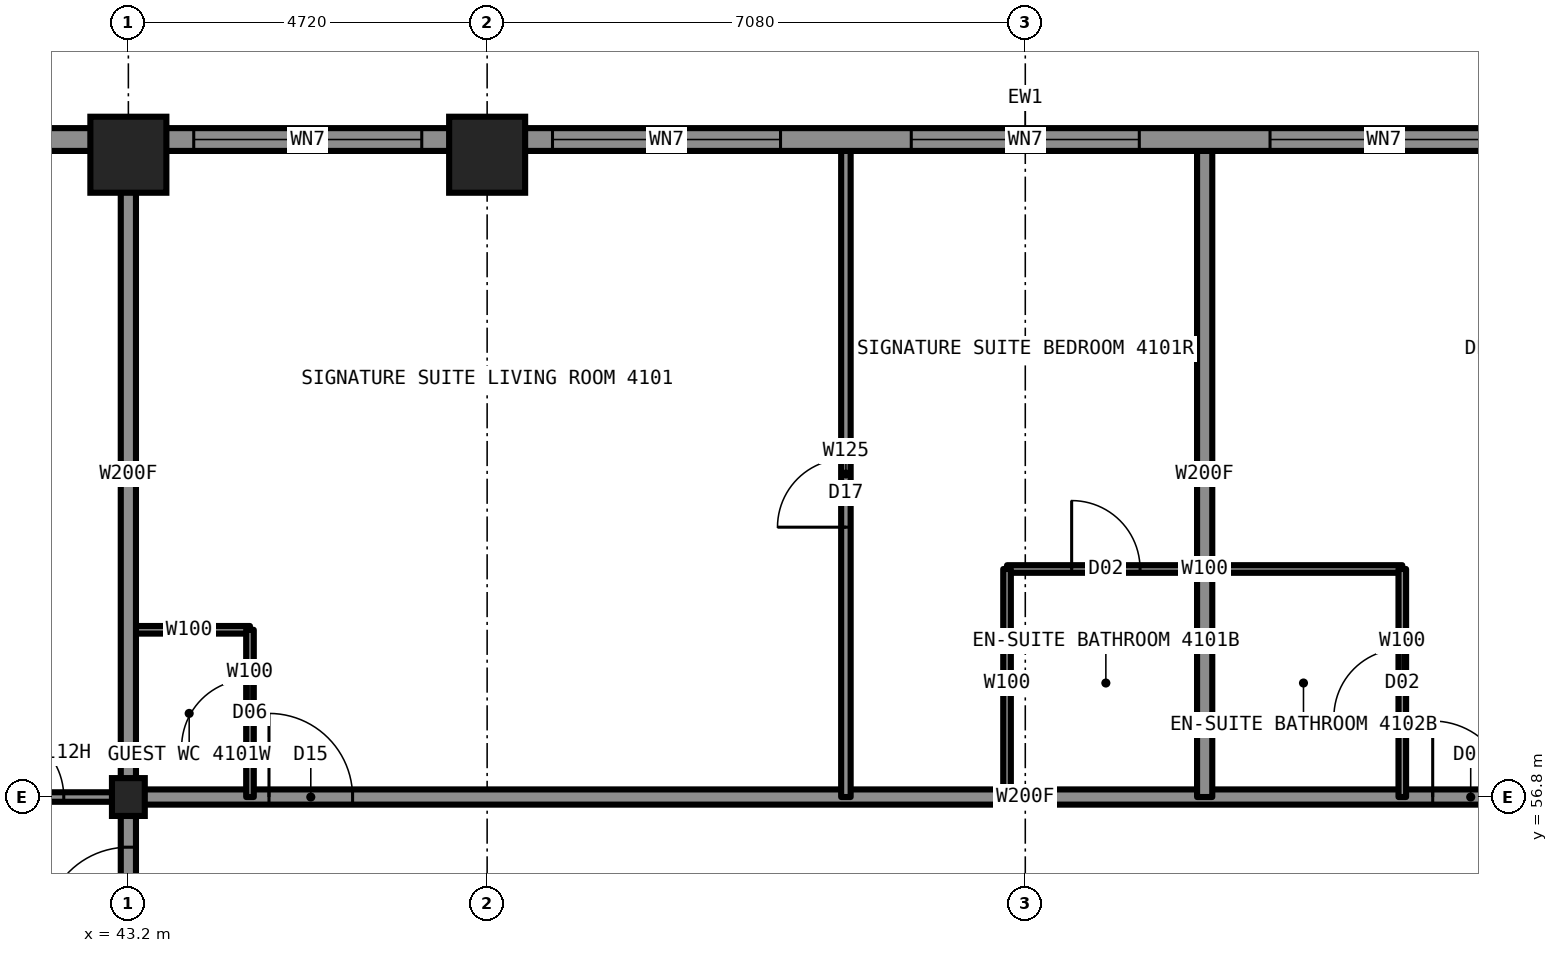
"""IFC4 building model, lengths in metres.
Left out: names, types, materials, properties, quantities, classifications, styles, units other than length and angle.
Written with IfcOpenShell. Run it as: python <this file> out.ifc"""

import sys

from ifc_helpers import new_model, si_unit, direction, frame, frame_2d, origin, origin_2d, place, context, subcontext, project, spatial, rectangle, i_section, extrude, element, fill, save


model = new_model("IFC4")
c1 = context("Model", 3, precision=1e-05, world=origin(), true_north=direction((0.0, 1.0)))
c2 = subcontext(c1, "Body", "Model", "MODEL_VIEW")
j1 = project(units=[si_unit("LENGTHUNIT", "METRE"), si_unit("PLANEANGLEUNIT", "RADIAN")], contexts=[c1])
p1 = place(None, origin())
s1 = spatial("IfcSite", under=j1, at=p1, CompositionType="ELEMENT")
p2 = place(p1, origin())
s2 = spatial("IfcBuilding", under=s1, at=p2, CompositionType="ELEMENT")
p3 = place(p2, frame((0.0, 0.0, 145.9)))
s3 = spatial("IfcBuildingStorey", under=s2, at=p3, CompositionType="ELEMENT", Elevation=145.9)
for number, where, z_axis, x_axis in (
    (1, (43.2, 65.25, 0.0), (0.0, 0.0, 1.0), (1.0, 0.0, 0.0)),
    (2, (47.92, 65.25, 0.0), (0.0, 0.0, 1.0), (1.0, 0.0, 0.0)),
):
    element("IfcColumn", number, at=place(p3, frame(where, z_axis=z_axis, x_axis=x_axis)), inside=s3, PredefinedType="COLUMN", context=c2, shape_type="SweptSolid", body=[
        extrude(i_section(OverallWidth=0.422, OverallDepth=0.465, WebThickness=0.045, FlangeThickness=0.073, at=origin_2d()), origin(), (0.0, 0.0, 1.0), 3.5),
    ])
p4 = place(p3, frame((43.2, 56.8, 0.0), z_axis=(0.0, 0.0, 1.0), x_axis=(1.0, 0.0, 0.0)))
e3 = element("IfcColumn", 3, at=p4, inside=s3, PredefinedType="COLUMN", context=c2, shape_type="SweptSolid", body=[
    extrude(i_section(OverallWidth=0.432, OverallDepth=0.498, WebThickness=0.056, FlangeThickness=0.089, at=origin_2d()), origin(), (0.0, 0.0, 1.0), 3.5),
])
p5 = place(p3, frame((43.2, 56.8, 0.0), z_axis=(0.0, 0.0, 1.0), x_axis=(1.0, 0.0, 0.0)))
e4 = element("IfcWall", 4, at=p5, inside=s3, PredefinedType="PARTITIONING", context=c2, shape_type="SweptSolid", body=[
    extrude(rectangle(XDim=23.6, YDim=0.2, at=frame_2d((11.8, 0.0))), origin(), (0.0, 0.0, 1.0), 3.33),
])
p6 = place(p5, frame((1.85, 0.0, 0.0)))
e5 = element("IfcOpeningElement", 5, at=p6, cuts=e4, PredefinedType="OPENING", context=c2, shape_type="SweptSolid", body=[
    extrude(rectangle(XDim=1.1, YDim=2.2, at=frame_2d((0.55, 1.1))), frame((0.0, 0.11, 0.0), z_axis=(0.0, -1.0, 0.0), x_axis=(1.0, 0.0, 0.0)), (0.0, 0.0, 1.0), 0.22),
])
p7 = place(p5, frame((17.16, 0.0, 0.0)))
e6 = element("IfcOpeningElement", 6, at=p7, cuts=e4, PredefinedType="OPENING", context=c2, shape_type="SweptSolid", body=[
    extrude(rectangle(XDim=1.0, YDim=2.2, at=frame_2d((0.5, 1.1))), frame((0.0, 0.11, 0.0), z_axis=(0.0, -1.0, 0.0), x_axis=(1.0, 0.0, 0.0)), (0.0, 0.0, 1.0), 0.22),
])
p8 = place(p3, frame((34.7, 56.8, 0.0), z_axis=(0.0, 0.0, 1.0), x_axis=(1.0, 0.0, 0.0)))
e7 = element("IfcWall", 7, at=p8, inside=s3, PredefinedType="PARTITIONING", context=c2, shape_type="SweptSolid", body=[
    extrude(rectangle(XDim=8.5, YDim=0.125, at=frame_2d((4.25, 0.0))), origin(), (0.0, 0.0, 1.0), 2.573),
])
p9 = place(p8, frame((6.75, 0.0, 0.0)))
e8 = element("IfcOpeningElement", 8, at=p9, cuts=e7, PredefinedType="OPENING", context=c2, shape_type="SweptSolid", body=[
    extrude(rectangle(XDim=0.9, YDim=2.2, at=frame_2d((0.45, 1.1))), frame((0.0, 0.073, 0.0), z_axis=(0.0, -1.0, 0.0), x_axis=(1.0, 0.0, 0.0)), (0.0, 0.0, 1.0), 0.145),
])
p10 = place(p3, frame((43.2, 59.0, 0.0), z_axis=(0.0, 0.0, 1.0), x_axis=(1.0, 0.0, 0.0)))
e9 = element("IfcWall", 9, at=p10, inside=s3, PredefinedType="PARTITIONING", context=c2, shape_type="SweptSolid", body=[
    extrude(rectangle(XDim=1.6, YDim=0.1, at=frame_2d((0.8, 0.0))), origin(), (0.0, 0.0, 1.0), 3.33),
])
p11 = place(p3, frame((54.76, 59.8, 0.0), z_axis=(0.0, 0.0, 1.0), x_axis=(1.0, 0.0, 0.0)))
e10 = element("IfcWall", 10, at=p11, inside=s3, PredefinedType="PARTITIONING", context=c2, shape_type="SweptSolid", body=[
    extrude(rectangle(XDim=5.2, YDim=0.1, at=frame_2d((2.6, 0.0))), origin(), (0.0, 0.0, 1.0), 3.33),
])
p12 = place(p11, frame((0.85, 0.0, 0.0)))
e11 = element("IfcOpeningElement", 11, at=p12, cuts=e10, PredefinedType="OPENING", context=c2, shape_type="SweptSolid", body=[
    extrude(rectangle(XDim=0.9, YDim=2.1, at=frame_2d((0.45, 1.05))), frame((0.0, 0.06, 0.0), z_axis=(0.0, -1.0, 0.0), x_axis=(1.0, 0.0, 0.0)), (0.0, 0.0, 1.0), 0.12),
])
p13 = place(p3, frame((54.76, 56.8, 0.0), z_axis=(0.0, 0.0, 1.0), x_axis=(0.0, 1.0, 0.0)))
e12 = element("IfcWall", 12, at=p13, inside=s3, PredefinedType="PARTITIONING", context=c2, shape_type="SweptSolid", body=[
    extrude(rectangle(XDim=3.0, YDim=0.1, at=frame_2d((1.5, 0.0))), origin(), (0.0, 0.0, 1.0), 3.33),
])
p14 = place(p3, frame((44.8, 56.8, 0.0), z_axis=(0.0, 0.0, 1.0), x_axis=(0.0, 1.0, 0.0)))
e13 = element("IfcWall", 13, at=p14, inside=s3, PredefinedType="PARTITIONING", context=c2, shape_type="SweptSolid", body=[
    extrude(rectangle(XDim=2.2, YDim=0.1, at=frame_2d((1.1, 0.0))), origin(), (0.0, 0.0, 1.0), 3.33),
])
p15 = place(p14, frame((0.65, 0.0, 0.0)))
e14 = element("IfcOpeningElement", 14, at=p15, cuts=e13, PredefinedType="OPENING", context=c2, shape_type="SweptSolid", body=[
    extrude(rectangle(XDim=0.9, YDim=2.1, at=frame_2d((0.45, 1.05))), frame((0.0, 0.06, 0.0), z_axis=(0.0, -1.0, 0.0), x_axis=(1.0, 0.0, 0.0)), (0.0, 0.0, 1.0), 0.12),
])
p16 = place(p3, frame((43.2, 52.08, 0.0), z_axis=(0.0, 0.0, 1.0), x_axis=(0.0, 1.0, 0.0)))
e15 = element("IfcWall", 15, at=p16, inside=s3, PredefinedType="PARTITIONING", context=c2, shape_type="SweptSolid", body=[
    extrude(rectangle(XDim=4.72, YDim=0.2, at=frame_2d((2.36, 0.0))), origin(), (0.0, 0.0, 1.0), 3.33),
])
p17 = place(p16, frame((2.96, 0.0, 0.0)))
e16 = element("IfcOpeningElement", 16, at=p17, cuts=e15, PredefinedType="OPENING", context=c2, shape_type="SweptSolid", body=[
    extrude(rectangle(XDim=1.1, YDim=2.2, at=frame_2d((0.55, 1.1))), frame((0.0, 0.11, 0.0), z_axis=(0.0, -1.0, 0.0), x_axis=(1.0, 0.0, 0.0)), (0.0, 0.0, 1.0), 0.22),
])
p18 = place(p3, frame((43.2, 56.8, 0.0), z_axis=(0.0, 0.0, 1.0), x_axis=(0.0, 1.0, 0.0)))
e17 = element("IfcWall", 17, at=p18, inside=s3, PredefinedType="PARTITIONING", context=c2, shape_type="SweptSolid", body=[
    extrude(rectangle(XDim=8.5, YDim=0.2, at=frame_2d((4.25, 0.0))), origin(), (0.0, 0.0, 1.0), 2.573),
])
p19 = place(p3, frame((52.64, 56.8, 0.0), z_axis=(0.0, 0.0, 1.0), x_axis=(0.0, 1.0, 0.0)))
e18 = element("IfcWall", 18, at=p19, inside=s3, PredefinedType="PARTITIONING", context=c2, shape_type="SweptSolid", body=[
    extrude(rectangle(XDim=8.5, YDim=0.125, at=frame_2d((4.25, 0.0))), origin(), (0.0, 0.0, 1.0), 3.33),
])
p20 = place(p19, frame((3.55, 0.0, 0.0)))
e19 = element("IfcOpeningElement", 19, at=p20, cuts=e18, PredefinedType="OPENING", context=c2, shape_type="SweptSolid", body=[
    extrude(rectangle(XDim=0.9, YDim=2.2, at=frame_2d((0.45, 1.1))), frame((0.0, 0.073, 0.0), z_axis=(0.0, -1.0, 0.0), x_axis=(1.0, 0.0, 0.0)), (0.0, 0.0, 1.0), 0.145),
])
p21 = place(p3, frame((57.36, 56.8, 0.0), z_axis=(0.0, 0.0, 1.0), x_axis=(0.0, 1.0, 0.0)))
e20 = element("IfcWall", 20, at=p21, inside=s3, PredefinedType="PARTITIONING", context=c2, shape_type="SweptSolid", body=[
    extrude(rectangle(XDim=8.5, YDim=0.2, at=frame_2d((4.25, 0.0))), origin(), (0.0, 0.0, 1.0), 3.33),
])
p22 = place(p3, frame((59.96, 56.8, 0.0), z_axis=(0.0, 0.0, 1.0), x_axis=(0.0, 1.0, 0.0)))
e21 = element("IfcWall", 21, at=p22, inside=s3, PredefinedType="PARTITIONING", context=c2, shape_type="SweptSolid", body=[
    extrude(rectangle(XDim=3.0, YDim=0.1, at=frame_2d((1.5, 0.0))), origin(), (0.0, 0.0, 1.0), 3.33),
])
p23 = place(p22, frame((1.05, 0.0, 0.0)))
e22 = element("IfcOpeningElement", 22, at=p23, cuts=e21, PredefinedType="OPENING", context=c2, shape_type="SweptSolid", body=[
    extrude(rectangle(XDim=0.9, YDim=2.1, at=frame_2d((0.45, 1.05))), frame((0.0, 0.06, 0.0), z_axis=(0.0, -1.0, 0.0), x_axis=(1.0, 0.0, 0.0)), (0.0, 0.0, 1.0), 0.12),
])
p24 = place(p3, frame((70.1, 65.45, 0.0), z_axis=(0.0, 0.0, 1.0), x_axis=(-1.0, 0.0, 0.0)))
e23 = element("IfcWall", 23, at=p24, inside=s3, PredefinedType="SOLIDWALL", context=c2, shape_type="SweptSolid", body=[
    extrude(rectangle(XDim=30.2, YDim=0.3, at=frame_2d((15.1, 0.0))), origin(), (0.0, 0.0, 1.0), 2.83),
])
p25 = place(p24, frame((1.3, 0.0, 0.8)))
e24 = element("IfcOpeningElement", 24, at=p25, cuts=e23, PredefinedType="OPENING", context=c2, shape_type="SweptSolid", body=[
    extrude(rectangle(XDim=1.1, YDim=1.7, at=frame_2d((0.55, 0.85))), frame((0.0, 0.16, 0.0), z_axis=(0.0, -1.0, 0.0), x_axis=(1.0, 0.0, 0.0)), (0.0, 0.0, 1.0), 0.32),
])
p26 = place(p24, frame((4.16, 0.0, 0.5)))
e25 = element("IfcOpeningElement", 25, at=p26, cuts=e23, PredefinedType="OPENING", context=c2, shape_type="SweptSolid", body=[
    extrude(rectangle(XDim=3.0, YDim=2.0, at=frame_2d((1.5, 1.0))), frame((0.0, 0.16, 0.0), z_axis=(0.0, -1.0, 0.0), x_axis=(1.0, 0.0, 0.0)), (0.0, 0.0, 1.0), 0.32),
])
p27 = place(p24, frame((8.88, 0.0, 0.5)))
e26 = element("IfcOpeningElement", 26, at=p27, cuts=e23, PredefinedType="OPENING", context=c2, shape_type="SweptSolid", body=[
    extrude(rectangle(XDim=3.0, YDim=2.0, at=frame_2d((1.5, 1.0))), frame((0.0, 0.16, 0.0), z_axis=(0.0, -1.0, 0.0), x_axis=(1.0, 0.0, 0.0)), (0.0, 0.0, 1.0), 0.32),
])
p28 = place(p24, frame((13.6, 0.0, 0.5)))
e27 = element("IfcOpeningElement", 27, at=p28, cuts=e23, PredefinedType="OPENING", context=c2, shape_type="SweptSolid", body=[
    extrude(rectangle(XDim=3.0, YDim=2.0, at=frame_2d((1.5, 1.0))), frame((0.0, 0.16, 0.0), z_axis=(0.0, -1.0, 0.0), x_axis=(1.0, 0.0, 0.0)), (0.0, 0.0, 1.0), 0.32),
])
p29 = place(p24, frame((18.32, 0.0, 0.5)))
e28 = element("IfcOpeningElement", 28, at=p29, cuts=e23, PredefinedType="OPENING", context=c2, shape_type="SweptSolid", body=[
    extrude(rectangle(XDim=3.0, YDim=2.0, at=frame_2d((1.5, 1.0))), frame((0.0, 0.16, 0.0), z_axis=(0.0, -1.0, 0.0), x_axis=(1.0, 0.0, 0.0)), (0.0, 0.0, 1.0), 0.32),
])
p30 = place(p24, frame((23.04, 0.0, 0.5)))
e29 = element("IfcOpeningElement", 29, at=p30, cuts=e23, PredefinedType="OPENING", context=c2, shape_type="SweptSolid", body=[
    extrude(rectangle(XDim=3.0, YDim=2.0, at=frame_2d((1.5, 1.0))), frame((0.0, 0.16, 0.0), z_axis=(0.0, -1.0, 0.0), x_axis=(1.0, 0.0, 0.0)), (0.0, 0.0, 1.0), 0.32),
])
p31 = place(p24, frame((27.75, 0.0, 0.8)))
e30 = element("IfcOpeningElement", 30, at=p31, cuts=e23, PredefinedType="OPENING", context=c2, shape_type="SweptSolid", body=[
    extrude(rectangle(XDim=1.1, YDim=1.7, at=frame_2d((0.55, 0.85))), frame((0.0, 0.16, 0.0), z_axis=(0.0, -1.0, 0.0), x_axis=(1.0, 0.0, 0.0)), (0.0, 0.0, 1.0), 0.32),
])
p32 = place(p6, origin())
e31 = element("IfcDoor", 31, at=p32, inside=s3, OperationType="SINGLE_SWING_LEFT", PredefinedType="DOOR", context=c2, shape_type="SweptSolid", body=[
    extrude(rectangle(XDim=1.1, YDim=2.2, at=frame_2d((0.55, 1.1))), frame((0.0, 0.025, 0.0), z_axis=(0.0, -1.0, 0.0), x_axis=(1.0, 0.0, 0.0)), (0.0, 0.0, 1.0), 0.05),
])
fill(e5, e31)
p33 = place(p12, origin())
e32 = element("IfcDoor", 32, at=p33, inside=s3, OperationType="SINGLE_SWING_RIGHT", PredefinedType="DOOR", context=c2, shape_type="SweptSolid", body=[
    extrude(rectangle(XDim=0.9, YDim=2.1, at=frame_2d((0.45, 1.05))), frame((0.0, 0.025, 0.0), z_axis=(0.0, -1.0, 0.0), x_axis=(1.0, 0.0, 0.0)), (0.0, 0.0, 1.0), 0.05),
])
fill(e11, e32)
p34 = place(p20, origin())
e33 = element("IfcDoor", 33, at=p34, inside=s3, OperationType="SINGLE_SWING_LEFT", PredefinedType="DOOR", context=c2, shape_type="SweptSolid", body=[
    extrude(rectangle(XDim=0.9, YDim=2.2, at=frame_2d((0.45, 1.1))), frame((0.0, 0.025, 0.0), z_axis=(0.0, -1.0, 0.0), x_axis=(1.0, 0.0, 0.0)), (0.0, 0.0, 1.0), 0.05),
])
fill(e19, e33)
p35 = place(p15, origin())
e34 = element("IfcDoor", 34, at=p35, inside=s3, OperationType="SINGLE_SWING_LEFT", PredefinedType="DOOR", context=c2, shape_type="SweptSolid", body=[
    extrude(rectangle(XDim=0.9, YDim=2.1, at=frame_2d((0.45, 1.05))), frame((0.0, 0.025, 0.0), z_axis=(0.0, -1.0, 0.0), x_axis=(1.0, 0.0, 0.0)), (0.0, 0.0, 1.0), 0.05),
])
fill(e14, e34)
p36 = place(p7, origin())
e35 = element("IfcDoor", 35, at=p36, inside=s3, OperationType="SINGLE_SWING_LEFT", PredefinedType="DOOR", context=c2, shape_type="SweptSolid", body=[
    extrude(rectangle(XDim=1.0, YDim=2.2, at=frame_2d((0.5, 1.1))), frame((0.0, 0.025, 0.0), z_axis=(0.0, -1.0, 0.0), x_axis=(1.0, 0.0, 0.0)), (0.0, 0.0, 1.0), 0.05),
])
fill(e6, e35)
p37 = place(p23, origin())
e36 = element("IfcDoor", 36, at=p37, inside=s3, OperationType="SINGLE_SWING_RIGHT", PredefinedType="DOOR", context=c2, shape_type="SweptSolid", body=[
    extrude(rectangle(XDim=0.9, YDim=2.1, at=frame_2d((0.45, 1.05))), frame((0.0, 0.025, 0.0), z_axis=(0.0, -1.0, 0.0), x_axis=(1.0, 0.0, 0.0)), (0.0, 0.0, 1.0), 0.05),
])
fill(e22, e36)
p38 = place(p9, origin())
e37 = element("IfcDoor", 37, at=p38, inside=s3, OperationType="SINGLE_SWING_LEFT", PredefinedType="DOOR", context=c2, shape_type="SweptSolid", body=[
    extrude(rectangle(XDim=0.9, YDim=2.2, at=frame_2d((0.45, 1.1))), frame((0.0, 0.025, 0.0), z_axis=(0.0, -1.0, 0.0), x_axis=(1.0, 0.0, 0.0)), (0.0, 0.0, 1.0), 0.05),
])
fill(e8, e37)
p39 = place(p17, origin())
e38 = element("IfcDoor", 38, at=p39, inside=s3, OperationType="SINGLE_SWING_LEFT", PredefinedType="DOOR", context=c2, shape_type="SweptSolid", body=[
    extrude(rectangle(XDim=1.1, YDim=2.2, at=frame_2d((0.55, 1.1))), frame((0.0, 0.025, 0.0), z_axis=(0.0, -1.0, 0.0), x_axis=(1.0, 0.0, 0.0)), (0.0, 0.0, 1.0), 0.05),
])
fill(e16, e38)
p40 = place(p27, origin())
e39 = element("IfcWindow", 39, at=p40, inside=s3, PartitioningType="SINGLE_PANEL", PredefinedType="WINDOW", context=c2, shape_type="SweptSolid", body=[
    extrude(rectangle(XDim=3.0, YDim=2.0, at=frame_2d((1.5, 1.0))), frame((0.0, 0.03, 0.0), z_axis=(0.0, -1.0, 0.0), x_axis=(1.0, 0.0, 0.0)), (0.0, 0.0, 1.0), 0.06),
])
fill(e26, e39)
p41 = place(p28, origin())
e40 = element("IfcWindow", 40, at=p41, inside=s3, PartitioningType="SINGLE_PANEL", PredefinedType="WINDOW", context=c2, shape_type="SweptSolid", body=[
    extrude(rectangle(XDim=3.0, YDim=2.0, at=frame_2d((1.5, 1.0))), frame((0.0, 0.03, 0.0), z_axis=(0.0, -1.0, 0.0), x_axis=(1.0, 0.0, 0.0)), (0.0, 0.0, 1.0), 0.06),
])
fill(e27, e40)
p42 = place(p29, origin())
e41 = element("IfcWindow", 41, at=p42, inside=s3, PartitioningType="SINGLE_PANEL", PredefinedType="WINDOW", context=c2, shape_type="SweptSolid", body=[
    extrude(rectangle(XDim=3.0, YDim=2.0, at=frame_2d((1.5, 1.0))), frame((0.0, 0.03, 0.0), z_axis=(0.0, -1.0, 0.0), x_axis=(1.0, 0.0, 0.0)), (0.0, 0.0, 1.0), 0.06),
])
fill(e28, e41)
p43 = place(p30, origin())
e42 = element("IfcWindow", 42, at=p43, inside=s3, PartitioningType="SINGLE_PANEL", PredefinedType="WINDOW", context=c2, shape_type="SweptSolid", body=[
    extrude(rectangle(XDim=3.0, YDim=2.0, at=frame_2d((1.5, 1.0))), frame((0.0, 0.03, 0.0), z_axis=(0.0, -1.0, 0.0), x_axis=(1.0, 0.0, 0.0)), (0.0, 0.0, 1.0), 0.06),
])
fill(e29, e42)
p44 = place(p31, origin())
e43 = element("IfcWindow", 43, at=p44, inside=s3, PartitioningType="SINGLE_PANEL", PredefinedType="WINDOW", context=c2, shape_type="SweptSolid", body=[
    extrude(rectangle(XDim=1.1, YDim=1.7, at=frame_2d((0.55, 0.85))), frame((0.0, 0.03, 0.0), z_axis=(0.0, -1.0, 0.0), x_axis=(1.0, 0.0, 0.0)), (0.0, 0.0, 1.0), 0.06),
])
fill(e30, e43)
save(model, sys.argv[1])
